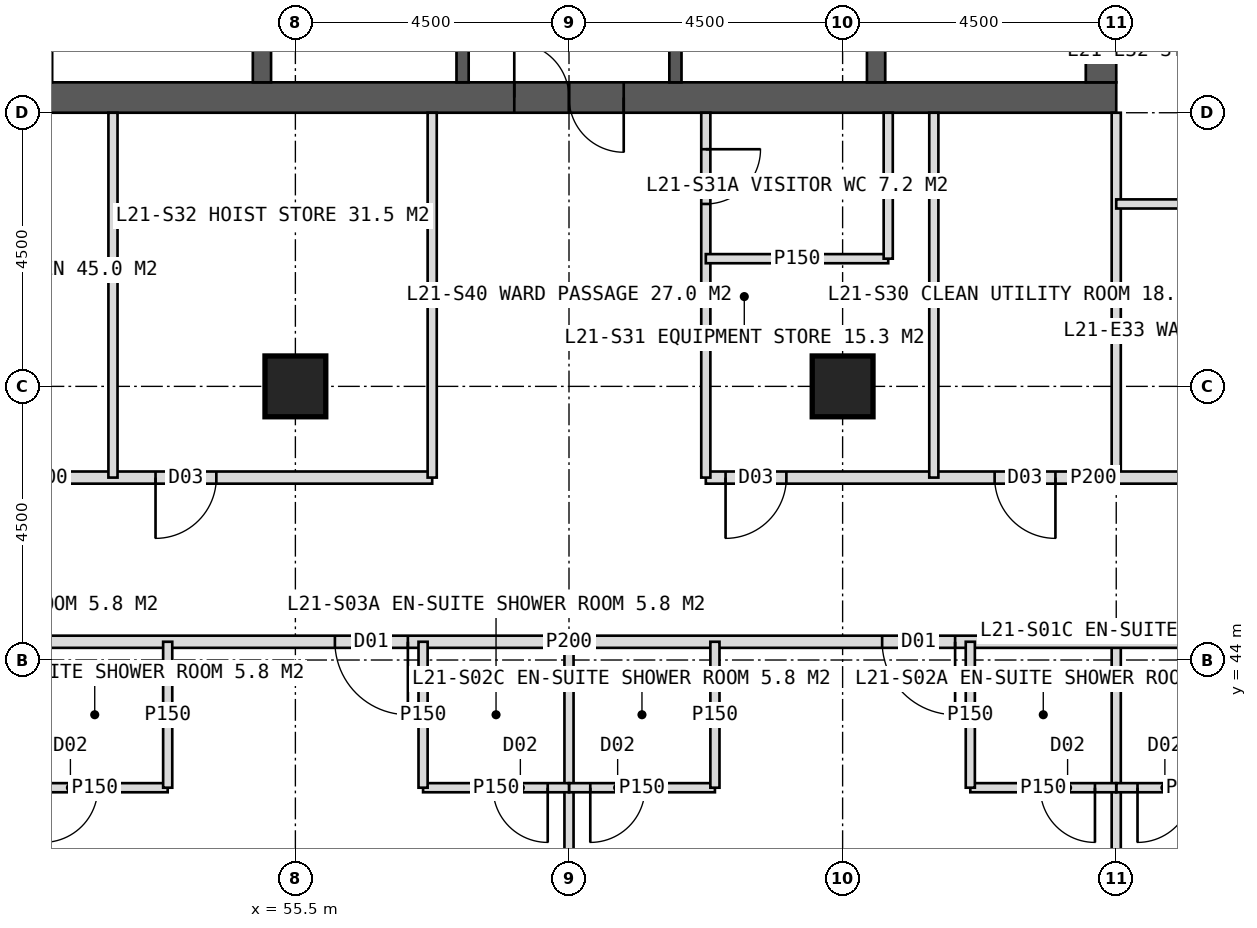
"""IFC4 building model, lengths in metres.
Left out: names, types, materials, properties, quantities, classifications, styles, units other than length and angle.
Written with IfcOpenShell. Run it as: python <this file> out.ifc"""

import sys

from ifc_helpers import new_model, si_unit, direction, frame, frame_2d, origin, origin_2d, place, context, subcontext, project, spatial, rectangle, hollow_rectangle, extrude, element, fill, save


model = new_model("IFC4")
c1 = context("Model", 3, precision=1e-05, world=origin(), true_north=direction((0.0, 1.0)))
c2 = subcontext(c1, "Body", "Model", "MODEL_VIEW")
j1 = project(units=[si_unit("LENGTHUNIT", "METRE"), si_unit("PLANEANGLEUNIT", "RADIAN")], contexts=[c1])
p1 = place(None, origin())
s1 = spatial("IfcSite", under=j1, at=p1, CompositionType="ELEMENT")
p2 = place(p1, origin())
s2 = spatial("IfcBuilding", under=s1, at=p2, CompositionType="ELEMENT")
p3 = place(p2, frame((0.0, 0.0, 91.0)))
s3 = spatial("IfcBuildingStorey", under=s2, at=p3, CompositionType="ELEMENT", Elevation=91.0)
p4 = place(p3, frame((51.0, 53.25, 0.0), z_axis=(0.0, 0.0, 1.0), x_axis=(1.0, 0.0, 0.0)))
e1 = element("IfcWall", 1, at=p4, inside=s3, PredefinedType="SHEAR", context=c2, shape_type="SweptSolid", body=[
    extrude(rectangle(XDim=18.0, YDim=0.5, at=frame_2d((9.0, 0.0))), origin(), (0.0, 0.0, 1.0), 4.0),
])
p5 = place(p4, frame((8.1, 0.0, 0.0)))
e2 = element("IfcOpeningElement", 2, at=p5, cuts=e1, PredefinedType="OPENING", context=c2, shape_type="SweptSolid", body=[
    extrude(rectangle(XDim=1.8, YDim=2.2, at=frame_2d((0.9, 1.1))), frame((0.0, 0.26, 0.0), z_axis=(0.0, -1.0, 0.0), x_axis=(1.0, 0.0, 0.0)), (0.0, 0.0, 1.0), 0.52),
])
p6 = place(p3, frame((68.75, 53.5, 0.0), z_axis=(0.0, 0.0, 1.0), x_axis=(0.0, 1.0, 0.0)))
e3 = element("IfcWall", 3, at=p6, inside=s3, PredefinedType="SHEAR", context=c2, shape_type="SweptSolid", body=[
    extrude(rectangle(XDim=17.0, YDim=0.5, at=frame_2d((8.5, 0.0))), origin(), (0.0, 0.0, 1.0), 4.0),
])
p7 = place(p6, frame((9.5, 0.0, 0.0)))
e4 = element("IfcOpeningElement", 4, at=p7, cuts=e3, PredefinedType="OPENING", context=c2, shape_type="SweptSolid", body=[
    extrude(rectangle(XDim=1.5, YDim=2.2, at=frame_2d((0.75, 1.1))), frame((0.0, 0.26, 0.0), z_axis=(0.0, -1.0, 0.0), x_axis=(1.0, 0.0, 0.0)), (0.0, 0.0, 1.0), 0.52),
])
for number, where, z_axis, x_axis in (
    (5, (54.95, 53.5, 0.0), (0.0, 0.0, 1.0), (0.0, 1.0, 0.0)),
    (6, (65.05, 53.5, 0.0), (0.0, 0.0, 1.0), (0.0, 1.0, 0.0)),
):
    element("IfcWall", number, at=place(p3, frame(where, z_axis=z_axis, x_axis=x_axis)), inside=s3, PredefinedType="SHEAR", context=c2, shape_type="SweptSolid", body=[
        extrude(rectangle(XDim=17.0, YDim=0.3, at=frame_2d((8.5, 0.0))), origin(), (0.0, 0.0, 1.0), 4.0),
    ])
p8 = place(p3, frame((58.25, 53.5, 0.0), z_axis=(0.0, 0.0, 1.0), x_axis=(0.0, 1.0, 0.0)))
e7 = element("IfcWall", 7, at=p8, inside=s3, PredefinedType="SHEAR", context=c2, shape_type="SweptSolid", body=[
    extrude(rectangle(XDim=17.0, YDim=0.2, at=frame_2d((8.5, 0.0))), origin(), (0.0, 0.0, 1.0), 4.0),
])
p9 = place(p8, frame((1.375, 0.0, 0.0)))
e8 = element("IfcOpeningElement", 8, at=p9, cuts=e7, PredefinedType="OPENING", context=c2, shape_type="SweptSolid", body=[
    extrude(rectangle(XDim=1.4, YDim=2.2, at=frame_2d((0.7, 1.1))), frame((0.0, 0.11, 0.0), z_axis=(0.0, -1.0, 0.0), x_axis=(1.0, 0.0, 0.0)), (0.0, 0.0, 1.0), 0.22),
])
p10 = place(p8, frame((5.675, 0.0, 0.0)))
e9 = element("IfcOpeningElement", 9, at=p10, cuts=e7, PredefinedType="OPENING", context=c2, shape_type="SweptSolid", body=[
    extrude(rectangle(XDim=1.4, YDim=2.2, at=frame_2d((0.7, 1.1))), frame((0.0, 0.11, 0.0), z_axis=(0.0, -1.0, 0.0), x_axis=(1.0, 0.0, 0.0)), (0.0, 0.0, 1.0), 0.22),
])
p11 = place(p3, frame((61.75, 53.5, 0.0), z_axis=(0.0, 0.0, 1.0), x_axis=(0.0, 1.0, 0.0)))
e10 = element("IfcWall", 10, at=p11, inside=s3, PredefinedType="SHEAR", context=c2, shape_type="SweptSolid", body=[
    extrude(rectangle(XDim=17.0, YDim=0.2, at=frame_2d((8.5, 0.0))), origin(), (0.0, 0.0, 1.0), 4.0),
])
p12 = place(p11, frame((1.375, 0.0, 0.0)))
e11 = element("IfcOpeningElement", 11, at=p12, cuts=e10, PredefinedType="OPENING", context=c2, shape_type="SweptSolid", body=[
    extrude(rectangle(XDim=1.4, YDim=2.2, at=frame_2d((0.7, 1.1))), frame((0.0, 0.11, 0.0), z_axis=(0.0, -1.0, 0.0), x_axis=(1.0, 0.0, 0.0)), (0.0, 0.0, 1.0), 0.22),
])
p13 = place(p11, frame((5.675, 0.0, 0.0)))
e12 = element("IfcOpeningElement", 12, at=p13, cuts=e10, PredefinedType="OPENING", context=c2, shape_type="SweptSolid", body=[
    extrude(rectangle(XDim=1.4, YDim=2.2, at=frame_2d((0.7, 1.1))), frame((0.0, 0.11, 0.0), z_axis=(0.0, -1.0, 0.0), x_axis=(1.0, 0.0, 0.0)), (0.0, 0.0, 1.0), 0.22),
])
for number, where, z_axis, x_axis in (
    (13, (55.5, 48.5, 0.0), (0.0, 0.0, 1.0), (1.0, 0.0, 0.0)),
    (14, (64.5, 48.5, 0.0), (0.0, 0.0, 1.0), (1.0, 0.0, 0.0)),
):
    element("IfcColumn", number, at=place(p3, frame(where, z_axis=z_axis, x_axis=x_axis)), inside=s3, PredefinedType="COLUMN", context=c2, shape_type="SweptSolid", body=[
        extrude(hollow_rectangle(XDim=1.0, YDim=1.0, WallThickness=0.1, at=origin_2d()), origin(), (0.0, 0.0, 1.0), 4.0),
    ])
p14 = place(p3, frame((69.0, 44.3, 0.0), z_axis=(0.0, 0.0, 1.0), x_axis=(0.0, -1.0, 0.0)))
e15 = element("IfcWall", 15, at=p14, inside=s3, PredefinedType="PARTITIONING", context=c2, shape_type="SweptSolid", body=[
    extrude(rectangle(XDim=7.575, YDim=0.15, at=frame_2d((3.788, 0.0))), origin(), (0.0, 0.0, 1.0), 3.75),
])
p15 = place(p3, frame((60.0, 44.3, 0.0), z_axis=(0.0, 0.0, 1.0), x_axis=(0.0, -1.0, 0.0)))
e16 = element("IfcWall", 16, at=p15, inside=s3, PredefinedType="PARTITIONING", context=c2, shape_type="SweptSolid", body=[
    extrude(rectangle(XDim=7.575, YDim=0.15, at=frame_2d((3.788, 0.0))), origin(), (0.0, 0.0, 1.0), 2.75),
])
p16 = place(p3, frame((77.7, 44.3, 0.0), z_axis=(0.0, 0.0, 1.0), x_axis=(-1.0, 0.0, 0.0)))
e17 = element("IfcWall", 17, at=p16, inside=s3, PredefinedType="PARTITIONING", context=c2, shape_type="SweptSolid", body=[
    extrude(rectangle(XDim=35.4, YDim=0.2, at=frame_2d((17.7, 0.0))), origin(), (0.0, 0.0, 1.0), 3.75),
])
p17 = place(p16, frame((2.65, 0.0, 0.0)))
e18 = element("IfcOpeningElement", 18, at=p17, cuts=e17, PredefinedType="OPENING", context=c2, shape_type="SweptSolid", body=[
    extrude(rectangle(XDim=1.2, YDim=2.2, at=frame_2d((0.6, 1.1))), frame((0.0, 0.11, 0.0), z_axis=(0.0, -1.0, 0.0), x_axis=(1.0, 0.0, 0.0)), (0.0, 0.0, 1.0), 0.22),
])
p18 = place(p16, frame((11.35, 0.0, 0.0)))
e19 = element("IfcOpeningElement", 19, at=p18, cuts=e17, PredefinedType="OPENING", context=c2, shape_type="SweptSolid", body=[
    extrude(rectangle(XDim=1.2, YDim=2.2, at=frame_2d((0.6, 1.1))), frame((0.0, 0.11, 0.0), z_axis=(0.0, -1.0, 0.0), x_axis=(1.0, 0.0, 0.0)), (0.0, 0.0, 1.0), 0.22),
])
p19 = place(p16, frame((20.35, 0.0, 0.0)))
e20 = element("IfcOpeningElement", 20, at=p19, cuts=e17, PredefinedType="OPENING", context=c2, shape_type="SweptSolid", body=[
    extrude(rectangle(XDim=1.2, YDim=2.2, at=frame_2d((0.6, 1.1))), frame((0.0, 0.11, 0.0), z_axis=(0.0, -1.0, 0.0), x_axis=(1.0, 0.0, 0.0)), (0.0, 0.0, 1.0), 0.22),
])
p20 = place(p16, frame((29.35, 0.0, 0.0)))
e21 = element("IfcOpeningElement", 21, at=p20, cuts=e17, PredefinedType="OPENING", context=c2, shape_type="SweptSolid", body=[
    extrude(rectangle(XDim=1.2, YDim=2.2, at=frame_2d((0.6, 1.1))), frame((0.0, 0.11, 0.0), z_axis=(0.0, -1.0, 0.0), x_axis=(1.0, 0.0, 0.0)), (0.0, 0.0, 1.0), 0.22),
])
p21 = place(p3, frame((71.4, 41.9, 0.0), z_axis=(0.0, 0.0, 1.0), x_axis=(-1.0, 0.0, 0.0)))
e22 = element("IfcWall", 22, at=p21, inside=s3, PredefinedType="PARTITIONING", context=c2, shape_type="SweptSolid", body=[
    extrude(rectangle(XDim=2.4, YDim=0.15, at=frame_2d((1.2, 0.0))), origin(), (0.0, 0.0, 1.0), 3.75),
])
p22 = place(p21, frame((1.15, 0.0, 0.0)))
e23 = element("IfcOpeningElement", 23, at=p22, cuts=e22, PredefinedType="OPENING", context=c2, shape_type="SweptSolid", body=[
    extrude(rectangle(XDim=0.9, YDim=2.1, at=frame_2d((0.45, 1.05))), frame((0.0, 0.085, 0.0), z_axis=(0.0, -1.0, 0.0), x_axis=(1.0, 0.0, 0.0)), (0.0, 0.0, 1.0), 0.17),
])
p23 = place(p3, frame((69.0, 41.9, 0.0), z_axis=(0.0, 0.0, 1.0), x_axis=(-1.0, 0.0, 0.0)))
e24 = element("IfcWall", 24, at=p23, inside=s3, PredefinedType="PARTITIONING", context=c2, shape_type="SweptSolid", body=[
    extrude(rectangle(XDim=2.4, YDim=0.15, at=frame_2d((1.2, 0.0))), origin(), (0.0, 0.0, 1.0), 3.75),
])
p24 = place(p23, frame((0.35, 0.0, 0.0)))
e25 = element("IfcOpeningElement", 25, at=p24, cuts=e24, PredefinedType="OPENING", context=c2, shape_type="SweptSolid", body=[
    extrude(rectangle(XDim=0.9, YDim=2.1, at=frame_2d((0.45, 1.05))), frame((0.0, 0.085, 0.0), z_axis=(0.0, -1.0, 0.0), x_axis=(1.0, 0.0, 0.0)), (0.0, 0.0, 1.0), 0.17),
])
p25 = place(p3, frame((66.6, 44.3, 0.0), z_axis=(0.0, 0.0, 1.0), x_axis=(0.0, -1.0, 0.0)))
e26 = element("IfcWall", 26, at=p25, inside=s3, PredefinedType="PARTITIONING", context=c2, shape_type="SweptSolid", body=[
    extrude(rectangle(XDim=2.4, YDim=0.15, at=frame_2d((1.2, 0.0))), origin(), (0.0, 0.0, 1.0), 3.75),
])
p26 = place(p3, frame((62.4, 41.9, 0.0), z_axis=(0.0, 0.0, 1.0), x_axis=(-1.0, 0.0, 0.0)))
e27 = element("IfcWall", 27, at=p26, inside=s3, PredefinedType="PARTITIONING", context=c2, shape_type="SweptSolid", body=[
    extrude(rectangle(XDim=2.4, YDim=0.15, at=frame_2d((1.2, 0.0))), origin(), (0.0, 0.0, 1.0), 3.75),
])
p27 = place(p26, frame((1.15, 0.0, 0.0)))
e28 = element("IfcOpeningElement", 28, at=p27, cuts=e27, PredefinedType="OPENING", context=c2, shape_type="SweptSolid", body=[
    extrude(rectangle(XDim=0.9, YDim=2.1, at=frame_2d((0.45, 1.05))), frame((0.0, 0.085, 0.0), z_axis=(0.0, -1.0, 0.0), x_axis=(1.0, 0.0, 0.0)), (0.0, 0.0, 1.0), 0.17),
])
p28 = place(p3, frame((62.4, 44.3, 0.0), z_axis=(0.0, 0.0, 1.0), x_axis=(0.0, -1.0, 0.0)))
e29 = element("IfcWall", 29, at=p28, inside=s3, PredefinedType="PARTITIONING", context=c2, shape_type="SweptSolid", body=[
    extrude(rectangle(XDim=2.4, YDim=0.15, at=frame_2d((1.2, 0.0))), origin(), (0.0, 0.0, 1.0), 3.75),
])
p29 = place(p3, frame((60.0, 41.9, 0.0), z_axis=(0.0, 0.0, 1.0), x_axis=(-1.0, 0.0, 0.0)))
e30 = element("IfcWall", 30, at=p29, inside=s3, PredefinedType="PARTITIONING", context=c2, shape_type="SweptSolid", body=[
    extrude(rectangle(XDim=2.4, YDim=0.15, at=frame_2d((1.2, 0.0))), origin(), (0.0, 0.0, 1.0), 3.75),
])
p30 = place(p29, frame((0.35, 0.0, 0.0)))
e31 = element("IfcOpeningElement", 31, at=p30, cuts=e30, PredefinedType="OPENING", context=c2, shape_type="SweptSolid", body=[
    extrude(rectangle(XDim=0.9, YDim=2.1, at=frame_2d((0.45, 1.05))), frame((0.0, 0.085, 0.0), z_axis=(0.0, -1.0, 0.0), x_axis=(1.0, 0.0, 0.0)), (0.0, 0.0, 1.0), 0.17),
])
p31 = place(p3, frame((57.6, 44.3, 0.0), z_axis=(0.0, 0.0, 1.0), x_axis=(0.0, -1.0, 0.0)))
e32 = element("IfcWall", 32, at=p31, inside=s3, PredefinedType="PARTITIONING", context=c2, shape_type="SweptSolid", body=[
    extrude(rectangle(XDim=2.4, YDim=0.15, at=frame_2d((1.2, 0.0))), origin(), (0.0, 0.0, 1.0), 3.75),
])
p32 = place(p3, frame((53.4, 41.9, 0.0), z_axis=(0.0, 0.0, 1.0), x_axis=(-1.0, 0.0, 0.0)))
e33 = element("IfcWall", 33, at=p32, inside=s3, PredefinedType="PARTITIONING", context=c2, shape_type="SweptSolid", body=[
    extrude(rectangle(XDim=2.4, YDim=0.15, at=frame_2d((1.2, 0.0))), origin(), (0.0, 0.0, 1.0), 3.75),
])
p33 = place(p32, frame((1.15, 0.0, 0.0)))
e34 = element("IfcOpeningElement", 34, at=p33, cuts=e33, PredefinedType="OPENING", context=c2, shape_type="SweptSolid", body=[
    extrude(rectangle(XDim=0.9, YDim=2.1, at=frame_2d((0.45, 1.05))), frame((0.0, 0.085, 0.0), z_axis=(0.0, -1.0, 0.0), x_axis=(1.0, 0.0, 0.0)), (0.0, 0.0, 1.0), 0.17),
])
p34 = place(p3, frame((53.4, 44.3, 0.0), z_axis=(0.0, 0.0, 1.0), x_axis=(0.0, -1.0, 0.0)))
e35 = element("IfcWall", 35, at=p34, inside=s3, PredefinedType="PARTITIONING", context=c2, shape_type="SweptSolid", body=[
    extrude(rectangle(XDim=2.4, YDim=0.15, at=frame_2d((1.2, 0.0))), origin(), (0.0, 0.0, 1.0), 3.75),
])
p35 = place(p3, frame((69.0, 53.0, 0.0), z_axis=(0.0, 0.0, 1.0), x_axis=(0.0, -1.0, 0.0)))
e36 = element("IfcWall", 36, at=p35, inside=s3, PredefinedType="PARTITIONING", context=c2, shape_type="SweptSolid", body=[
    extrude(rectangle(XDim=6.0, YDim=0.15, at=frame_2d((3.0, 0.0))), origin(), (0.0, 0.0, 1.0), 3.75),
])
p36 = place(p3, frame((75.0, 47.0, 0.0), z_axis=(0.0, 0.0, 1.0), x_axis=(-1.0, 0.0, 0.0)))
e37 = element("IfcWall", 37, at=p36, inside=s3, PredefinedType="PARTITIONING", context=c2, shape_type="SweptSolid", body=[
    extrude(rectangle(XDim=12.75, YDim=0.2, at=frame_2d((6.375, 0.0))), origin(), (0.0, 0.0, 1.0), 3.75),
])
p37 = place(p36, frame((7.0, 0.0, 0.0)))
e38 = element("IfcOpeningElement", 38, at=p37, cuts=e37, PredefinedType="OPENING", context=c2, shape_type="SweptSolid", body=[
    extrude(rectangle(XDim=1.0, YDim=2.1, at=frame_2d((0.5, 1.05))), frame((0.0, 0.11, 0.0), z_axis=(0.0, -1.0, 0.0), x_axis=(1.0, 0.0, 0.0)), (0.0, 0.0, 1.0), 0.22),
])
p38 = place(p36, frame((11.425, 0.0, 0.0)))
e39 = element("IfcOpeningElement", 39, at=p38, cuts=e37, PredefinedType="OPENING", context=c2, shape_type="SweptSolid", body=[
    extrude(rectangle(XDim=1.0, YDim=2.1, at=frame_2d((0.5, 1.05))), frame((0.0, 0.11, 0.0), z_axis=(0.0, -1.0, 0.0), x_axis=(1.0, 0.0, 0.0)), (0.0, 0.0, 1.0), 0.22),
])
p39 = place(p3, frame((57.75, 47.0, 0.0), z_axis=(0.0, 0.0, 1.0), x_axis=(-1.0, 0.0, 0.0)))
e40 = element("IfcWall", 40, at=p39, inside=s3, PredefinedType="PARTITIONING", context=c2, shape_type="SweptSolid", body=[
    extrude(rectangle(XDim=12.75, YDim=0.2, at=frame_2d((6.375, 0.0))), origin(), (0.0, 0.0, 1.0), 3.75),
])
p40 = place(p39, frame((3.55, 0.0, 0.0)))
e41 = element("IfcOpeningElement", 41, at=p40, cuts=e40, PredefinedType="OPENING", context=c2, shape_type="SweptSolid", body=[
    extrude(rectangle(XDim=1.0, YDim=2.1, at=frame_2d((0.5, 1.05))), frame((0.0, 0.11, 0.0), z_axis=(0.0, -1.0, 0.0), x_axis=(1.0, 0.0, 0.0)), (0.0, 0.0, 1.0), 0.22),
])
p41 = place(p39, frame((8.5, 0.0, 0.0)))
e42 = element("IfcOpeningElement", 42, at=p41, cuts=e40, PredefinedType="OPENING", context=c2, shape_type="SweptSolid", body=[
    extrude(rectangle(XDim=1.0, YDim=2.1, at=frame_2d((0.5, 1.05))), frame((0.0, 0.11, 0.0), z_axis=(0.0, -1.0, 0.0), x_axis=(1.0, 0.0, 0.0)), (0.0, 0.0, 1.0), 0.22),
])
p42 = place(p3, frame((62.25, 53.0, 0.0), z_axis=(0.0, 0.0, 1.0), x_axis=(0.0, -1.0, 0.0)))
e43 = element("IfcWall", 43, at=p42, inside=s3, PredefinedType="PARTITIONING", context=c2, shape_type="SweptSolid", body=[
    extrude(rectangle(XDim=6.0, YDim=0.15, at=frame_2d((3.0, 0.0))), origin(), (0.0, 0.0, 1.0), 3.75),
])
p43 = place(p42, frame((0.6, 0.0, 0.0)))
e44 = element("IfcOpeningElement", 44, at=p43, cuts=e43, PredefinedType="OPENING", context=c2, shape_type="SweptSolid", body=[
    extrude(rectangle(XDim=0.9, YDim=2.1, at=frame_2d((0.45, 1.05))), frame((0.0, 0.085, 0.0), z_axis=(0.0, -1.0, 0.0), x_axis=(1.0, 0.0, 0.0)), (0.0, 0.0, 1.0), 0.17),
])
for number, where, z_axis, x_axis in (
    (45, (57.75, 53.0, 0.0), (0.0, 0.0, 1.0), (0.0, -1.0, 0.0)),
    (46, (66.0, 53.0, 0.0), (0.0, 0.0, 1.0), (0.0, -1.0, 0.0)),
    (47, (52.5, 53.0, 0.0), (0.0, 0.0, 1.0), (0.0, -1.0, 0.0)),
):
    element("IfcWall", number, at=place(p3, frame(where, z_axis=z_axis, x_axis=x_axis)), inside=s3, PredefinedType="PARTITIONING", context=c2, shape_type="SweptSolid", body=[
        extrude(rectangle(XDim=6.0, YDim=0.15, at=frame_2d((3.0, 0.0))), origin(), (0.0, 0.0, 1.0), 3.75),
    ])
p44 = place(p3, frame((65.25, 50.6, 0.0), z_axis=(0.0, 0.0, 1.0), x_axis=(-1.0, 0.0, 0.0)))
e48 = element("IfcWall", 48, at=p44, inside=s3, PredefinedType="PARTITIONING", context=c2, shape_type="SweptSolid", body=[
    extrude(rectangle(XDim=3.0, YDim=0.15, at=frame_2d((1.5, 0.0))), origin(), (0.0, 0.0, 1.0), 3.75),
])
p45 = place(p3, frame((65.25, 53.0, 0.0), z_axis=(0.0, 0.0, 1.0), x_axis=(0.0, -1.0, 0.0)))
e49 = element("IfcWall", 49, at=p45, inside=s3, PredefinedType="PARTITIONING", context=c2, shape_type="SweptSolid", body=[
    extrude(rectangle(XDim=2.4, YDim=0.15, at=frame_2d((1.2, 0.0))), origin(), (0.0, 0.0, 1.0), 3.75),
])
p46 = place(p3, frame((69.0, 51.5, 0.0), z_axis=(0.0, 0.0, 1.0), x_axis=(1.0, 0.0, 0.0)))
e50 = element("IfcWall", 50, at=p46, inside=s3, PredefinedType="PARTITIONING", context=c2, shape_type="SweptSolid", body=[
    extrude(rectangle(XDim=6.0, YDim=0.15, at=frame_2d((3.0, 0.0))), origin(), (0.0, 0.0, 1.0), 3.75),
])
p47 = place(p22, origin())
e51 = element("IfcDoor", 51, at=p47, inside=s3, OperationType="SINGLE_SWING_RIGHT", PredefinedType="DOOR", context=c2, shape_type="SweptSolid", body=[
    extrude(rectangle(XDim=0.9, YDim=2.1, at=frame_2d((0.45, 1.05))), frame((0.0, 0.025, 0.0), z_axis=(0.0, -1.0, 0.0), x_axis=(1.0, 0.0, 0.0)), (0.0, 0.0, 1.0), 0.05),
])
fill(e23, e51)
p48 = place(p18, origin())
e52 = element("IfcDoor", 52, at=p48, inside=s3, OperationType="SINGLE_SWING_LEFT", PredefinedType="DOOR", context=c2, shape_type="SweptSolid", body=[
    extrude(rectangle(XDim=1.2, YDim=2.2, at=frame_2d((0.6, 1.1))), frame((0.0, 0.025, 0.0), z_axis=(0.0, -1.0, 0.0), x_axis=(1.0, 0.0, 0.0)), (0.0, 0.0, 1.0), 0.05),
])
fill(e19, e52)
p49 = place(p24, origin())
e53 = element("IfcDoor", 53, at=p49, inside=s3, OperationType="SINGLE_SWING_LEFT", PredefinedType="DOOR", context=c2, shape_type="SweptSolid", body=[
    extrude(rectangle(XDim=0.9, YDim=2.1, at=frame_2d((0.45, 1.05))), frame((0.0, 0.025, 0.0), z_axis=(0.0, -1.0, 0.0), x_axis=(1.0, 0.0, 0.0)), (0.0, 0.0, 1.0), 0.05),
])
fill(e25, e53)
p50 = place(p27, origin())
e54 = element("IfcDoor", 54, at=p50, inside=s3, OperationType="SINGLE_SWING_RIGHT", PredefinedType="DOOR", context=c2, shape_type="SweptSolid", body=[
    extrude(rectangle(XDim=0.9, YDim=2.1, at=frame_2d((0.45, 1.05))), frame((0.0, 0.025, 0.0), z_axis=(0.0, -1.0, 0.0), x_axis=(1.0, 0.0, 0.0)), (0.0, 0.0, 1.0), 0.05),
])
fill(e28, e54)
p51 = place(p19, origin())
e55 = element("IfcDoor", 55, at=p51, inside=s3, OperationType="SINGLE_SWING_LEFT", PredefinedType="DOOR", context=c2, shape_type="SweptSolid", body=[
    extrude(rectangle(XDim=1.2, YDim=2.2, at=frame_2d((0.6, 1.1))), frame((0.0, 0.025, 0.0), z_axis=(0.0, -1.0, 0.0), x_axis=(1.0, 0.0, 0.0)), (0.0, 0.0, 1.0), 0.05),
])
fill(e20, e55)
p52 = place(p30, origin())
e56 = element("IfcDoor", 56, at=p52, inside=s3, OperationType="SINGLE_SWING_LEFT", PredefinedType="DOOR", context=c2, shape_type="SweptSolid", body=[
    extrude(rectangle(XDim=0.9, YDim=2.1, at=frame_2d((0.45, 1.05))), frame((0.0, 0.025, 0.0), z_axis=(0.0, -1.0, 0.0), x_axis=(1.0, 0.0, 0.0)), (0.0, 0.0, 1.0), 0.05),
])
fill(e31, e56)
p53 = place(p33, origin())
e57 = element("IfcDoor", 57, at=p53, inside=s3, OperationType="SINGLE_SWING_RIGHT", PredefinedType="DOOR", context=c2, shape_type="SweptSolid", body=[
    extrude(rectangle(XDim=0.9, YDim=2.1, at=frame_2d((0.45, 1.05))), frame((0.0, 0.025, 0.0), z_axis=(0.0, -1.0, 0.0), x_axis=(1.0, 0.0, 0.0)), (0.0, 0.0, 1.0), 0.05),
])
fill(e34, e57)
p54 = place(p37, origin())
e58 = element("IfcDoor", 58, at=p54, inside=s3, OperationType="SINGLE_SWING_LEFT", PredefinedType="DOOR", context=c2, shape_type="SweptSolid", body=[
    extrude(rectangle(XDim=1.0, YDim=2.1, at=frame_2d((0.5, 1.05))), frame((0.0, 0.025, 0.0), z_axis=(0.0, -1.0, 0.0), x_axis=(1.0, 0.0, 0.0)), (0.0, 0.0, 1.0), 0.05),
])
fill(e38, e58)
p55 = place(p43, origin())
e59 = element("IfcDoor", 59, at=p55, inside=s3, OperationType="SINGLE_SWING_LEFT", PredefinedType="DOOR", context=c2, shape_type="SweptSolid", body=[
    extrude(rectangle(XDim=0.9, YDim=2.1, at=frame_2d((0.45, 1.05))), frame((0.0, 0.025, 0.0), z_axis=(0.0, -1.0, 0.0), x_axis=(1.0, 0.0, 0.0)), (0.0, 0.0, 1.0), 0.05),
])
fill(e44, e59)
p56 = place(p38, origin())
e60 = element("IfcDoor", 60, at=p56, inside=s3, OperationType="SINGLE_SWING_RIGHT", PredefinedType="DOOR", context=c2, shape_type="SweptSolid", body=[
    extrude(rectangle(XDim=1.0, YDim=2.1, at=frame_2d((0.5, 1.05))), frame((0.0, 0.025, 0.0), z_axis=(0.0, -1.0, 0.0), x_axis=(1.0, 0.0, 0.0)), (0.0, 0.0, 1.0), 0.05),
])
fill(e39, e60)
p57 = place(p40, origin())
e61 = element("IfcDoor", 61, at=p57, inside=s3, OperationType="SINGLE_SWING_RIGHT", PredefinedType="DOOR", context=c2, shape_type="SweptSolid", body=[
    extrude(rectangle(XDim=1.0, YDim=2.1, at=frame_2d((0.5, 1.05))), frame((0.0, 0.025, 0.0), z_axis=(0.0, -1.0, 0.0), x_axis=(1.0, 0.0, 0.0)), (0.0, 0.0, 1.0), 0.05),
])
fill(e41, e61)
p58 = place(p5, origin())
e62 = element("IfcDoor", 62, at=p58, inside=s3, OperationType="DOUBLE_DOOR_SINGLE_SWING", PredefinedType="DOOR", context=c2, shape_type="SweptSolid", body=[
    extrude(rectangle(XDim=1.8, YDim=2.2, at=frame_2d((0.9, 1.1))), frame((0.0, 0.025, 0.0), z_axis=(0.0, -1.0, 0.0), x_axis=(1.0, 0.0, 0.0)), (0.0, 0.0, 1.0), 0.05),
])
fill(e2, e62)
save(model, sys.argv[1])
